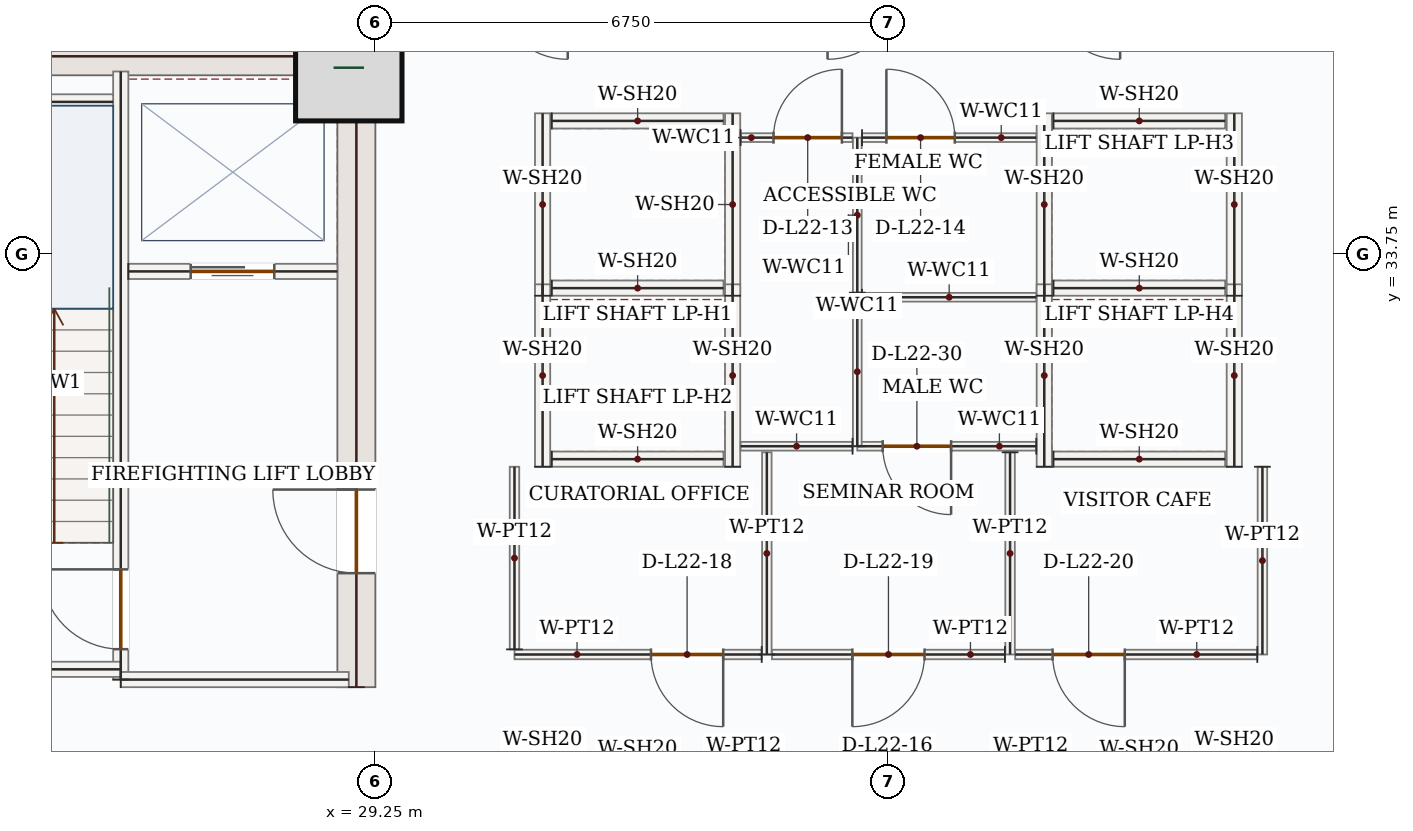
"""IFC4 building model, lengths in metres.
Left out: names, types, materials, properties, quantities, classifications, styles, units other than length and angle.
Written with IfcOpenShell. Run it as: python <this file> out.ifc"""

import sys

from ifc_helpers import new_model, si_unit, direction, frame, frame_2d, origin, origin_2d, place, context, subcontext, project, spatial, rectangle, extrude, source, transform, mapped, element, fill, save


model = new_model("IFC4")
c1 = context("Model", 3, precision=1e-05, world=origin(), true_north=direction((0.0, 1.0)))
c2 = subcontext(c1, "Body", "Model", "MODEL_VIEW")
j1 = project(units=[si_unit("LENGTHUNIT", "METRE"), si_unit("PLANEANGLEUNIT", "RADIAN")], contexts=[c1])
p1 = place(None, origin())
s1 = spatial("IfcSite", under=j1, at=p1, CompositionType="ELEMENT")
p2 = place(p1, origin())
s2 = spatial("IfcBuilding", under=s1, at=p2, CompositionType="ELEMENT")
p3 = place(p2, frame((0.0, 0.0, 100.5)))
s3 = spatial("IfcBuildingStorey", under=s2, at=p3, CompositionType="ELEMENT", Elevation=100.5)
p4 = place(p3, frame((29.0, 28.05, 0.0), z_axis=(0.0, 0.0, 1.0), x_axis=(0.0, 1.0, 0.0)))
e1 = element("IfcWall", 1, at=p4, inside=s3, PredefinedType="SHEAR", context=c2, shape_type="SweptSolid", body=[
    extrude(rectangle(XDim=8.55, YDim=0.5, at=frame_2d((4.275, 0.0))), origin(), (0.0, 0.0, 1.0), 3.95),
])
p5 = place(p4, frame((1.5, 0.0, 0.0)))
e2 = element("IfcOpeningElement", 2, at=p5, cuts=e1, PredefinedType="OPENING", context=c2, shape_type="SweptSolid", body=[
    extrude(rectangle(XDim=1.1, YDim=2.2, at=frame_2d((0.55, 1.1))), frame((0.0, 0.26, 0.0), z_axis=(0.0, -1.0, 0.0), x_axis=(1.0, 0.0, 0.0)), (0.0, 0.0, 1.0), 0.52),
])
m1 = source(origin(), c2, "Body", "SweptSolid", [
    extrude(rectangle(XDim=7.0, YDim=0.5, at=frame_2d((3.5, 0.0))), origin(), (0.0, 0.0, 1.0), 3.95),
])
p6 = place(p3, frame((21.75, 36.35, 0.0), z_axis=(0.0, 0.0, 1.0), x_axis=(1.0, 0.0, 0.0)))
e3 = element("IfcWall", 3, at=p6, inside=s3, PredefinedType="SHEAR", context=c2, shape_type="MappedRepresentation", body=[
    mapped(m1, transform((0.0, 0.0, 0.0), x_axis=(1.0, 0.0, 0.0), y_axis=(0.0, 1.0, 0.0), z_axis=(0.0, 0.0, 1.0), scale=1.0)),
])
m2 = source(origin(), c2, "Body", "SweptSolid", [
    extrude(rectangle(XDim=1.4, YDim=1.4, at=origin_2d()), origin(), (0.0, 0.0, 1.0), 4.2),
])
p7 = place(p3, frame((28.9, 36.2, 0.0), z_axis=(0.0, 0.0, 1.0), x_axis=(1.0, 0.0, 0.0)))
e4 = element("IfcColumn", 4, at=p7, inside=s3, PredefinedType="COLUMN", context=c2, shape_type="MappedRepresentation", body=[
    mapped(m2, transform((0.0, 0.0, 0.0), x_axis=(1.0, 0.0, 0.0), y_axis=(0.0, 1.0, 0.0), z_axis=(0.0, 0.0, 1.0), scale=1.0)),
])
p8 = place(p3, frame((25.9, 28.15, 0.0), z_axis=(0.0, 0.0, 1.0), x_axis=(0.0, 1.0, 0.0)))
e5 = element("IfcWall", 5, at=p8, inside=s3, PredefinedType="SOLIDWALL", context=c2, shape_type="SweptSolid", body=[
    extrude(rectangle(XDim=8.0, YDim=0.2, at=frame_2d((4.0, 0.0))), origin(), (0.0, 0.0, 1.0), 3.95),
])
p9 = place(p8, frame((0.4, 0.0, 0.0)))
e6 = element("IfcOpeningElement", 6, at=p9, cuts=e5, PredefinedType="OPENING", context=c2, shape_type="SweptSolid", body=[
    extrude(rectangle(XDim=1.05, YDim=2.15, at=frame_2d((0.525, 1.075))), frame((0.0, 0.11, 0.0), z_axis=(0.0, -1.0, 0.0), x_axis=(1.0, 0.0, 0.0)), (0.0, 0.0, 1.0), 0.22),
])
m3 = source(origin(), c2, "Body", "SweptSolid", [
    extrude(rectangle(XDim=4.25, YDim=0.2, at=frame_2d((2.125, 0.0))), origin(), (0.0, 0.0, 1.0), 3.95),
])
p10 = place(p3, frame((21.65, 28.285, 0.0), z_axis=(0.0, 0.0, 1.0), x_axis=(1.0, 0.0, 0.0)))
e7 = element("IfcWall", 7, at=p10, inside=s3, PredefinedType="SOLIDWALL", context=c2, shape_type="MappedRepresentation", body=[
    mapped(m3, transform((0.0, 0.0, 0.0), x_axis=(1.0, 0.0, 0.0), y_axis=(0.0, 1.0, 0.0), z_axis=(0.0, 0.0, 1.0), scale=1.0)),
])
m4 = source(origin(), c2, "Body", "SweptSolid", [
    extrude(rectangle(XDim=3.0, YDim=0.2, at=frame_2d((1.5, 0.0))), origin(), (0.0, 0.0, 1.0), 3.95),
])
p11 = place(p3, frame((25.9, 28.15, 0.0), z_axis=(0.0, 0.0, 1.0), x_axis=(1.0, 0.0, 0.0)))
e8 = element("IfcWall", 8, at=p11, inside=s3, PredefinedType="SOLIDWALL", context=c2, shape_type="MappedRepresentation", body=[
    mapped(m4, transform((0.0, 0.0, 0.0), x_axis=(1.0, 0.0, 0.0), y_axis=(0.0, 1.0, 0.0), z_axis=(0.0, 0.0, 1.0), scale=1.0)),
])
m5 = source(origin(), c2, "Body", "SweptSolid", [
    extrude(rectangle(XDim=3.25, YDim=0.2, at=frame_2d((1.625, 0.0))), origin(), (0.0, 0.0, 1.0), 3.95),
])
p12 = place(p3, frame((22.55, 35.75, 0.0), z_axis=(0.0, 0.0, 1.0), x_axis=(1.0, 0.0, 0.0)))
e9 = element("IfcWall", 9, at=p12, inside=s3, PredefinedType="SOLIDWALL", context=c2, shape_type="MappedRepresentation", body=[
    mapped(m5, transform((0.0, 0.0, 0.0), x_axis=(1.0, 0.0, 0.0), y_axis=(0.0, 1.0, 0.0), z_axis=(0.0, 0.0, 1.0), scale=1.0)),
])
p13 = place(p3, frame((26.0, 33.52, 0.0), z_axis=(0.0, 0.0, 1.0), x_axis=(1.0, 0.0, 0.0)))
e10 = element("IfcWall", 10, at=p13, inside=s3, PredefinedType="SOLIDWALL", context=c2, shape_type="SweptSolid", body=[
    extrude(rectangle(XDim=2.75, YDim=0.2, at=frame_2d((1.375, 0.0))), origin(), (0.0, 0.0, 1.0), 3.95),
])
p14 = place(p13, frame((0.82, 0.0, 0.0)))
e11 = element("IfcOpeningElement", 11, at=p14, cuts=e10, PredefinedType="OPENING", context=c2, shape_type="SweptSolid", body=[
    extrude(rectangle(XDim=1.1, YDim=2.15, at=frame_2d((0.55, 1.075))), frame((0.0, 0.11, 0.0), z_axis=(0.0, -1.0, 0.0), x_axis=(1.0, 0.0, 0.0)), (0.0, 0.0, 1.0), 0.22),
])
m6 = source(origin(), c2, "Body", "SweptSolid", [
    extrude(rectangle(XDim=2.4, YDim=0.2, at=frame_2d((1.2, 0.0))), origin(), (0.0, 0.0, 1.0), 3.95),
])
for number, where, z_axis, x_axis in (
    (12, (31.45, 33.2, 0.0), (0.0, 0.0, 1.0), (0.0, 1.0, 0.0)),
    (13, (33.95, 33.2, 0.0), (0.0, 0.0, 1.0), (0.0, 1.0, 0.0)),
):
    element("IfcWall", number, at=place(p3, frame(where, z_axis=z_axis, x_axis=x_axis)), inside=s3, PredefinedType="SOLIDWALL", context=c2, shape_type="MappedRepresentation", body=[
        mapped(m6, transform((0.0, 0.0, 0.0), x_axis=(1.0, 0.0, 0.0), y_axis=(0.0, 1.0, 0.0), z_axis=(0.0, 0.0, 1.0), scale=1.0)),
    ])
m7 = source(origin(), c2, "Body", "SweptSolid", [
    extrude(rectangle(XDim=2.26, YDim=0.2, at=frame_2d((1.13, 0.0))), origin(), (0.0, 0.0, 1.0), 3.95),
])
for number, where, z_axis, x_axis in (
    (14, (31.57, 33.3, 0.0), (0.0, 0.0, 1.0), (1.0, 0.0, 0.0)),
    (15, (31.57, 35.5, 0.0), (0.0, 0.0, 1.0), (1.0, 0.0, 0.0)),
):
    element("IfcWall", number, at=place(p3, frame(where, z_axis=z_axis, x_axis=x_axis)), inside=s3, PredefinedType="SOLIDWALL", context=c2, shape_type="MappedRepresentation", body=[
        mapped(m7, transform((0.0, 0.0, 0.0), x_axis=(1.0, 0.0, 0.0), y_axis=(0.0, 1.0, 0.0), z_axis=(0.0, 0.0, 1.0), scale=1.0)),
    ])
for number, where, z_axis, x_axis in (
    (16, (31.45, 30.95, 0.0), (0.0, 0.0, 1.0), (0.0, 1.0, 0.0)),
    (17, (33.95, 30.95, 0.0), (0.0, 0.0, 1.0), (0.0, 1.0, 0.0)),
):
    element("IfcWall", number, at=place(p3, frame(where, z_axis=z_axis, x_axis=x_axis)), inside=s3, PredefinedType="SOLIDWALL", context=c2, shape_type="MappedRepresentation", body=[
        mapped(m6, transform((0.0, 0.0, 0.0), x_axis=(1.0, 0.0, 0.0), y_axis=(0.0, 1.0, 0.0), z_axis=(0.0, 0.0, 1.0), scale=1.0)),
    ])
p15 = place(p3, frame((31.57, 31.05, 0.0), z_axis=(0.0, 0.0, 1.0), x_axis=(1.0, 0.0, 0.0)))
e18 = element("IfcWall", 18, at=p15, inside=s3, PredefinedType="SOLIDWALL", context=c2, shape_type="MappedRepresentation", body=[
    mapped(m7, transform((0.0, 0.0, 0.0), x_axis=(1.0, 0.0, 0.0), y_axis=(0.0, 1.0, 0.0), z_axis=(0.0, 0.0, 1.0), scale=1.0)),
])
for number, where, z_axis, x_axis in (
    (19, (38.05, 33.2, 0.0), (0.0, 0.0, 1.0), (0.0, 1.0, 0.0)),
    (20, (40.55, 33.2, 0.0), (0.0, 0.0, 1.0), (0.0, 1.0, 0.0)),
):
    element("IfcWall", number, at=place(p3, frame(where, z_axis=z_axis, x_axis=x_axis)), inside=s3, PredefinedType="SOLIDWALL", context=c2, shape_type="MappedRepresentation", body=[
        mapped(m6, transform((0.0, 0.0, 0.0), x_axis=(1.0, 0.0, 0.0), y_axis=(0.0, 1.0, 0.0), z_axis=(0.0, 0.0, 1.0), scale=1.0)),
    ])
for number, where, z_axis, x_axis in (
    (21, (38.17, 33.3, 0.0), (0.0, 0.0, 1.0), (1.0, 0.0, 0.0)),
    (22, (38.17, 35.5, 0.0), (0.0, 0.0, 1.0), (1.0, 0.0, 0.0)),
):
    element("IfcWall", number, at=place(p3, frame(where, z_axis=z_axis, x_axis=x_axis)), inside=s3, PredefinedType="SOLIDWALL", context=c2, shape_type="MappedRepresentation", body=[
        mapped(m7, transform((0.0, 0.0, 0.0), x_axis=(1.0, 0.0, 0.0), y_axis=(0.0, 1.0, 0.0), z_axis=(0.0, 0.0, 1.0), scale=1.0)),
    ])
for number, where, z_axis, x_axis in (
    (23, (38.05, 30.95, 0.0), (0.0, 0.0, 1.0), (0.0, 1.0, 0.0)),
    (24, (40.55, 30.95, 0.0), (0.0, 0.0, 1.0), (0.0, 1.0, 0.0)),
):
    element("IfcWall", number, at=place(p3, frame(where, z_axis=z_axis, x_axis=x_axis)), inside=s3, PredefinedType="SOLIDWALL", context=c2, shape_type="MappedRepresentation", body=[
        mapped(m6, transform((0.0, 0.0, 0.0), x_axis=(1.0, 0.0, 0.0), y_axis=(0.0, 1.0, 0.0), z_axis=(0.0, 0.0, 1.0), scale=1.0)),
    ])
p16 = place(p3, frame((38.17, 31.05, 0.0), z_axis=(0.0, 0.0, 1.0), x_axis=(1.0, 0.0, 0.0)))
e25 = element("IfcWall", 25, at=p16, inside=s3, PredefinedType="SOLIDWALL", context=c2, shape_type="MappedRepresentation", body=[
    mapped(m7, transform((0.0, 0.0, 0.0), x_axis=(1.0, 0.0, 0.0), y_axis=(0.0, 1.0, 0.0), z_axis=(0.0, 0.0, 1.0), scale=1.0)),
])
p17 = place(p3, frame((37.945, 31.22, 0.0), z_axis=(0.0, 0.0, 1.0), x_axis=(-1.0, 0.0, 0.0)))
e26 = element("IfcWall", 26, at=p17, inside=s3, PredefinedType="PARTITIONING", context=c2, shape_type="SweptSolid", body=[
    extrude(rectangle(XDim=2.355, YDim=0.115, at=frame_2d((1.177, 0.0))), origin(), (0.0, 0.0, 1.0), 3.95),
])
p18 = place(p17, frame((1.121, 0.0, 0.0)))
e27 = element("IfcOpeningElement", 27, at=p18, cuts=e26, PredefinedType="OPENING", context=c2, shape_type="SweptSolid", body=[
    extrude(rectangle(XDim=0.9, YDim=2.1, at=frame_2d((0.45, 1.05))), frame((0.0, 0.067, 0.0), z_axis=(0.0, -1.0, 0.0), x_axis=(1.0, 0.0, 0.0)), (0.0, 0.0, 1.0), 0.135),
])
m8 = source(origin(), c2, "Body", "SweptSolid", [
    extrude(rectangle(XDim=1.96, YDim=0.115, at=frame_2d((0.98, 0.0))), origin(), (0.0, 0.0, 1.0), 3.95),
])
p19 = place(p3, frame((35.59, 31.22, 0.0), z_axis=(0.0, 0.0, 1.0), x_axis=(0.0, 1.0, 0.0)))
e28 = element("IfcWall", 28, at=p19, inside=s3, PredefinedType="PARTITIONING", context=c2, shape_type="MappedRepresentation", body=[
    mapped(m8, transform((0.0, 0.0, 0.0), x_axis=(1.0, 0.0, 0.0), y_axis=(0.0, 1.0, 0.0), z_axis=(0.0, 0.0, 1.0), scale=1.0)),
])
m9 = source(origin(), c2, "Body", "SweptSolid", [
    extrude(rectangle(XDim=2.292, YDim=0.115, at=frame_2d((1.146, 0.0))), origin(), (0.0, 0.0, 1.0), 3.95),
])
p20 = place(p3, frame((35.653, 33.18, 0.0), z_axis=(0.0, 0.0, 1.0), x_axis=(1.0, 0.0, 0.0)))
e29 = element("IfcWall", 29, at=p20, inside=s3, PredefinedType="PARTITIONING", context=c2, shape_type="MappedRepresentation", body=[
    mapped(m9, transform((0.0, 0.0, 0.0), x_axis=(1.0, 0.0, 0.0), y_axis=(0.0, 1.0, 0.0), z_axis=(0.0, 0.0, 1.0), scale=1.0)),
])
m10 = source(origin(), c2, "Body", "SweptSolid", [
    extrude(rectangle(XDim=2.04, YDim=0.115, at=frame_2d((1.02, 0.0))), origin(), (0.0, 0.0, 1.0), 3.95),
])
p21 = place(p3, frame((35.59, 33.24, 0.0), z_axis=(0.0, 0.0, 1.0), x_axis=(0.0, 1.0, 0.0)))
e30 = element("IfcWall", 30, at=p21, inside=s3, PredefinedType="PARTITIONING", context=c2, shape_type="MappedRepresentation", body=[
    mapped(m10, transform((0.0, 0.0, 0.0), x_axis=(1.0, 0.0, 0.0), y_axis=(0.0, 1.0, 0.0), z_axis=(0.0, 0.0, 1.0), scale=1.0)),
])
p22 = place(p3, frame((35.653, 35.28, 0.0), z_axis=(0.0, 0.0, 1.0), x_axis=(1.0, 0.0, 0.0)))
e31 = element("IfcWall", 31, at=p22, inside=s3, PredefinedType="PARTITIONING", context=c2, shape_type="SweptSolid", body=[
    extrude(rectangle(XDim=2.292, YDim=0.115, at=frame_2d((1.146, 0.0))), origin(), (0.0, 0.0, 1.0), 3.95),
])
p23 = place(p22, frame((0.32, 0.0, 0.0)))
e32 = element("IfcOpeningElement", 32, at=p23, cuts=e31, PredefinedType="OPENING", context=c2, shape_type="SweptSolid", body=[
    extrude(rectangle(XDim=0.9, YDim=2.1, at=frame_2d((0.45, 1.05))), frame((0.0, 0.067, 0.0), z_axis=(0.0, -1.0, 0.0), x_axis=(1.0, 0.0, 0.0)), (0.0, 0.0, 1.0), 0.135),
])
m11 = source(origin(), c2, "Body", "SweptSolid", [
    extrude(rectangle(XDim=1.473, YDim=0.115, at=frame_2d((0.736, 0.0))), origin(), (0.0, 0.0, 1.0), 3.95),
])
p24 = place(p3, frame((35.528, 31.22, 0.0), z_axis=(0.0, 0.0, 1.0), x_axis=(-1.0, 0.0, 0.0)))
e33 = element("IfcWall", 33, at=p24, inside=s3, PredefinedType="PARTITIONING", context=c2, shape_type="MappedRepresentation", body=[
    mapped(m11, transform((0.0, 0.0, 0.0), x_axis=(1.0, 0.0, 0.0), y_axis=(0.0, 1.0, 0.0), z_axis=(0.0, 0.0, 1.0), scale=1.0)),
])
p25 = place(p3, frame((34.055, 35.28, 0.0), z_axis=(0.0, 0.0, 1.0), x_axis=(1.0, 0.0, 0.0)))
e34 = element("IfcWall", 34, at=p25, inside=s3, PredefinedType="PARTITIONING", context=c2, shape_type="SweptSolid", body=[
    extrude(rectangle(XDim=1.473, YDim=0.115, at=frame_2d((0.736, 0.0))), origin(), (0.0, 0.0, 1.0), 3.95),
])
p26 = place(p25, frame((0.433, 0.0, 0.0)))
e35 = element("IfcOpeningElement", 35, at=p26, cuts=e34, PredefinedType="OPENING", context=c2, shape_type="SweptSolid", body=[
    extrude(rectangle(XDim=0.9, YDim=2.1, at=frame_2d((0.45, 1.05))), frame((0.0, 0.067, 0.0), z_axis=(0.0, -1.0, 0.0), x_axis=(1.0, 0.0, 0.0)), (0.0, 0.0, 1.0), 0.135),
])
m12 = source(origin(), c2, "Body", "SweptSolid", [
    extrude(rectangle(XDim=2.66, YDim=0.125, at=frame_2d((1.33, 0.0))), origin(), (0.0, 0.0, 1.0), 3.95),
])
for number, where, z_axis, x_axis in (
    (36, (34.4, 28.48, 0.0), (0.0, 0.0, 1.0), (0.0, 1.0, 0.0)),
    (37, (37.6, 31.14, 0.0), (0.0, 0.0, 1.0), (0.0, -1.0, 0.0)),
):
    element("IfcWall", number, at=place(p3, frame(where, z_axis=z_axis, x_axis=x_axis)), inside=s3, PredefinedType="PARTITIONING", context=c2, shape_type="MappedRepresentation", body=[
        mapped(m12, transform((0.0, 0.0, 0.0), x_axis=(1.0, 0.0, 0.0), y_axis=(0.0, 1.0, 0.0), z_axis=(0.0, 0.0, 1.0), scale=1.0)),
    ])
p27 = place(p3, frame((37.532, 28.48, 0.0), z_axis=(0.0, 0.0, 1.0), x_axis=(-1.0, 0.0, 0.0)))
e38 = element("IfcWall", 38, at=p27, inside=s3, PredefinedType="PARTITIONING", context=c2, shape_type="SweptSolid", body=[
    extrude(rectangle(XDim=3.065, YDim=0.125, at=frame_2d((1.532, 0.0))), origin(), (0.0, 0.0, 1.0), 3.95),
])
p28 = place(p27, frame((1.058, 0.0, 0.0)))
e39 = element("IfcOpeningElement", 39, at=p28, cuts=e38, PredefinedType="OPENING", context=c2, shape_type="SweptSolid", body=[
    extrude(rectangle(XDim=0.95, YDim=2.15, at=frame_2d((0.475, 1.075))), frame((0.0, 0.073, 0.0), z_axis=(0.0, -1.0, 0.0), x_axis=(1.0, 0.0, 0.0)), (0.0, 0.0, 1.0), 0.145),
])
p29 = place(p3, frame((34.333, 28.48, 0.0), z_axis=(0.0, 0.0, 1.0), x_axis=(-1.0, 0.0, 0.0)))
e40 = element("IfcWall", 40, at=p29, inside=s3, PredefinedType="PARTITIONING", context=c2, shape_type="SweptSolid", body=[
    extrude(rectangle(XDim=3.252, YDim=0.125, at=frame_2d((1.626, 0.0))), origin(), (0.0, 0.0, 1.0), 3.95),
])
p30 = place(p29, frame((0.507, 0.0, 0.0)))
e41 = element("IfcOpeningElement", 41, at=p30, cuts=e40, PredefinedType="OPENING", context=c2, shape_type="SweptSolid", body=[
    extrude(rectangle(XDim=0.95, YDim=2.15, at=frame_2d((0.475, 1.075))), frame((0.0, 0.073, 0.0), z_axis=(0.0, -1.0, 0.0), x_axis=(1.0, 0.0, 0.0)), (0.0, 0.0, 1.0), 0.145),
])
m13 = source(origin(), c2, "Body", "SweptSolid", [
    extrude(rectangle(XDim=2.402, YDim=0.125, at=frame_2d((1.201, 0.0))), origin(), (0.0, 0.0, 1.0), 3.95),
])
p31 = place(p3, frame((31.08, 28.548, 0.0), z_axis=(0.0, 0.0, 1.0), x_axis=(0.0, 1.0, 0.0)))
e42 = element("IfcWall", 42, at=p31, inside=s3, PredefinedType="PARTITIONING", context=c2, shape_type="MappedRepresentation", body=[
    mapped(m13, transform((0.0, 0.0, 0.0), x_axis=(1.0, 0.0, 0.0), y_axis=(0.0, 1.0, 0.0), z_axis=(0.0, 0.0, 1.0), scale=1.0)),
])
m14 = source(origin(), c2, "Body", "SweptSolid", [
    extrude(rectangle(XDim=2.47, YDim=0.125, at=frame_2d((1.235, 0.0))), origin(), (0.0, 0.0, 1.0), 3.95),
])
p32 = place(p3, frame((40.92, 30.95, 0.0), z_axis=(0.0, 0.0, 1.0), x_axis=(0.0, -1.0, 0.0)))
e43 = element("IfcWall", 43, at=p32, inside=s3, PredefinedType="PARTITIONING", context=c2, shape_type="MappedRepresentation", body=[
    mapped(m14, transform((0.0, 0.0, 0.0), x_axis=(1.0, 0.0, 0.0), y_axis=(0.0, 1.0, 0.0), z_axis=(0.0, 0.0, 1.0), scale=1.0)),
])
p33 = place(p3, frame((40.853, 28.48, 0.0), z_axis=(0.0, 0.0, 1.0), x_axis=(-1.0, 0.0, 0.0)))
e44 = element("IfcWall", 44, at=p33, inside=s3, PredefinedType="PARTITIONING", context=c2, shape_type="SweptSolid", body=[
    extrude(rectangle(XDim=3.185, YDim=0.125, at=frame_2d((1.593, 0.0))), origin(), (0.0, 0.0, 1.0), 3.95),
])
p34 = place(p33, frame((1.743, 0.0, 0.0)))
e45 = element("IfcOpeningElement", 45, at=p34, cuts=e44, PredefinedType="OPENING", context=c2, shape_type="SweptSolid", body=[
    extrude(rectangle(XDim=0.95, YDim=2.15, at=frame_2d((0.475, 1.075))), frame((0.0, 0.073, 0.0), z_axis=(0.0, -1.0, 0.0), x_axis=(1.0, 0.0, 0.0)), (0.0, 0.0, 1.0), 0.145),
])
m15 = source(origin(), c2, "Body", "SweptSolid", [
    extrude(rectangle(XDim=1.05, YDim=2.15, at=frame_2d((0.525, 1.075))), frame((0.0, 0.025, 0.0), z_axis=(0.0, -1.0, 0.0), x_axis=(1.0, 0.0, 0.0)), (0.0, 0.0, 1.0), 0.05),
])
p35 = place(p9, origin())
e46 = element("IfcDoor", 46, at=p35, inside=s3, OperationType="SINGLE_SWING_RIGHT", PredefinedType="DOOR", context=c2, shape_type="MappedRepresentation", body=[
    mapped(m15, transform((0.0, 0.0, 0.0), x_axis=(1.0, 0.0, 0.0), y_axis=(0.0, 1.0, 0.0), z_axis=(0.0, 0.0, 1.0), scale=1.0)),
])
fill(e6, e46)
m16 = source(origin(), c2, "Body", "SweptSolid", [
    extrude(rectangle(XDim=1.1, YDim=2.15, at=frame_2d((0.55, 1.075))), frame((0.0, 0.025, 0.0), z_axis=(0.0, -1.0, 0.0), x_axis=(1.0, 0.0, 0.0)), (0.0, 0.0, 1.0), 0.05),
])
p36 = place(p14, origin())
e47 = element("IfcDoor", 47, at=p36, inside=s3, OperationType="DOUBLE_DOOR_SLIDING", PredefinedType="DOOR", context=c2, shape_type="MappedRepresentation", body=[
    mapped(m16, transform((0.0, 0.0, 0.0), x_axis=(1.0, 0.0, 0.0), y_axis=(0.0, 1.0, 0.0), z_axis=(0.0, 0.0, 1.0), scale=1.0)),
])
fill(e11, e47)
m17 = source(origin(), c2, "Body", "SweptSolid", [
    extrude(rectangle(XDim=1.1, YDim=2.2, at=frame_2d((0.55, 1.1))), frame((0.0, 0.025, 0.0), z_axis=(0.0, -1.0, 0.0), x_axis=(1.0, 0.0, 0.0)), (0.0, 0.0, 1.0), 0.05),
])
p37 = place(p5, origin())
e48 = element("IfcDoor", 48, at=p37, inside=s3, OperationType="SINGLE_SWING_RIGHT", PredefinedType="DOOR", context=c2, shape_type="MappedRepresentation", body=[
    mapped(m17, transform((0.0, 0.0, 0.0), x_axis=(1.0, 0.0, 0.0), y_axis=(0.0, 1.0, 0.0), z_axis=(0.0, 0.0, 1.0), scale=1.0)),
])
fill(e2, e48)
m18 = source(origin(), c2, "Body", "SweptSolid", [
    extrude(rectangle(XDim=0.9, YDim=2.1, at=frame_2d((0.45, 1.05))), frame((0.0, 0.025, 0.0), z_axis=(0.0, -1.0, 0.0), x_axis=(1.0, 0.0, 0.0)), (0.0, 0.0, 1.0), 0.05),
])
p38 = place(p26, origin())
e49 = element("IfcDoor", 49, at=p38, inside=s3, OperationType="SINGLE_SWING_RIGHT", PredefinedType="DOOR", context=c2, shape_type="MappedRepresentation", body=[
    mapped(m18, transform((0.0, 0.0, 0.0), x_axis=(1.0, 0.0, 0.0), y_axis=(0.0, 1.0, 0.0), z_axis=(0.0, 0.0, 1.0), scale=1.0)),
])
fill(e35, e49)
p39 = place(p23, origin())
e50 = element("IfcDoor", 50, at=p39, inside=s3, OperationType="SINGLE_SWING_LEFT", PredefinedType="DOOR", context=c2, shape_type="MappedRepresentation", body=[
    mapped(m18, transform((0.0, 0.0, 0.0), x_axis=(1.0, 0.0, 0.0), y_axis=(0.0, 1.0, 0.0), z_axis=(0.0, 0.0, 1.0), scale=1.0)),
])
fill(e32, e50)
m19 = source(origin(), c2, "Body", "SweptSolid", [
    extrude(rectangle(XDim=0.95, YDim=2.15, at=frame_2d((0.475, 1.075))), frame((0.0, 0.025, 0.0), z_axis=(0.0, -1.0, 0.0), x_axis=(1.0, 0.0, 0.0)), (0.0, 0.0, 1.0), 0.05),
])
p40 = place(p30, origin())
e51 = element("IfcDoor", 51, at=p40, inside=s3, OperationType="SINGLE_SWING_LEFT", PredefinedType="DOOR", context=c2, shape_type="MappedRepresentation", body=[
    mapped(m19, transform((0.0, 0.0, 0.0), x_axis=(1.0, 0.0, 0.0), y_axis=(0.0, 1.0, 0.0), z_axis=(0.0, 0.0, 1.0), scale=1.0)),
])
fill(e41, e51)
p41 = place(p28, origin())
e52 = element("IfcDoor", 52, at=p41, inside=s3, OperationType="SINGLE_SWING_RIGHT", PredefinedType="DOOR", context=c2, shape_type="MappedRepresentation", body=[
    mapped(m19, transform((0.0, 0.0, 0.0), x_axis=(1.0, 0.0, 0.0), y_axis=(0.0, 1.0, 0.0), z_axis=(0.0, 0.0, 1.0), scale=1.0)),
])
fill(e39, e52)
p42 = place(p34, origin())
e53 = element("IfcDoor", 53, at=p42, inside=s3, OperationType="SINGLE_SWING_LEFT", PredefinedType="DOOR", context=c2, shape_type="MappedRepresentation", body=[
    mapped(m19, transform((0.0, 0.0, 0.0), x_axis=(1.0, 0.0, 0.0), y_axis=(0.0, 1.0, 0.0), z_axis=(0.0, 0.0, 1.0), scale=1.0)),
])
fill(e45, e53)
p43 = place(p18, origin())
e54 = element("IfcDoor", 54, at=p43, inside=s3, OperationType="SINGLE_SWING_LEFT", PredefinedType="DOOR", context=c2, shape_type="MappedRepresentation", body=[
    mapped(m18, transform((0.0, 0.0, 0.0), x_axis=(1.0, 0.0, 0.0), y_axis=(0.0, 1.0, 0.0), z_axis=(0.0, 0.0, 1.0), scale=1.0)),
])
fill(e27, e54)
save(model, sys.argv[1])
